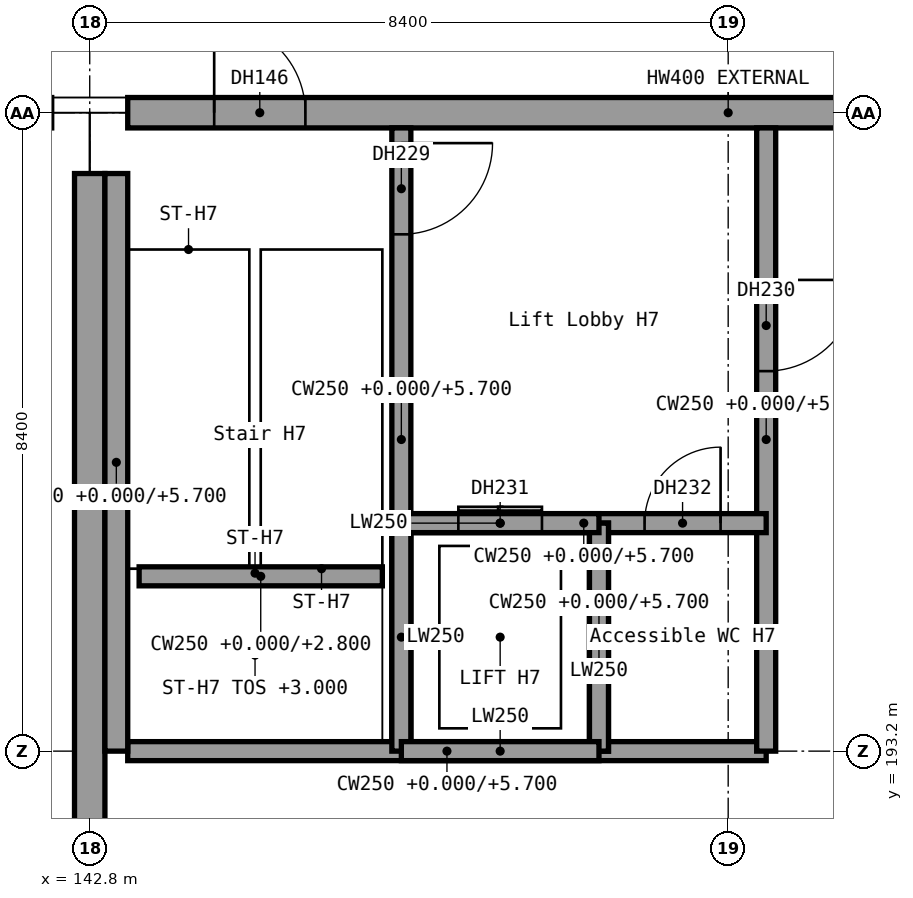
"""IFC4 building model, lengths in metres.
Left out: names, types, materials, properties, quantities, classifications, styles, units other than length and angle.
Written with IfcOpenShell. Run it as: python <this file> out.ifc"""

import sys

from ifc_helpers import new_model, si_unit, direction, frame, frame_2d, origin, origin_2d, place, context, subcontext, project, spatial, rectangle, extrude, element, fill, save


model = new_model("IFC4")
c1 = context("Model", 3, precision=1e-05, world=origin(), true_north=direction((0.0, 1.0)))
c2 = subcontext(c1, "Body", "Model", "MODEL_VIEW")
j1 = project(units=[si_unit("LENGTHUNIT", "METRE"), si_unit("PLANEANGLEUNIT", "RADIAN")], contexts=[c1])
p1 = place(None, origin())
s1 = spatial("IfcSite", under=j1, at=p1, CompositionType="ELEMENT")
p2 = place(p1, origin())
s2 = spatial("IfcBuilding", under=s1, at=p2, CompositionType="ELEMENT")
p3 = place(p2, origin())
s3 = spatial("IfcBuildingStorey", under=s2, at=p3, CompositionType="ELEMENT", Elevation=0.0)
p4 = place(p3, frame((142.8, 201.6, 0.0), z_axis=(0.0, 0.0, 1.0), x_axis=(1.0, 0.0, 0.0)))
e1 = element("IfcColumn", 1, at=p4, inside=s3, PredefinedType="COLUMN", context=c2, shape_type="SweptSolid", body=[
    extrude(rectangle(XDim=1.0, YDim=1.6, at=origin_2d()), origin(), (0.0, 0.0, 1.0), 6.0),
])
p5 = place(p3, frame((143.3, 201.6, 0.0), z_axis=(0.0, 0.0, 1.0), x_axis=(1.0, 0.0, 0.0)))
e2 = element("IfcWall", 2, at=p5, inside=s3, PredefinedType="STANDARD", context=c2, shape_type="SweptSolid", body=[
    extrude(rectangle(XDim=15.8, YDim=0.4, at=frame_2d((7.9, 0.0))), origin(), (0.0, 0.0, 1.0), 4.5),
])
p6 = place(p5, frame((1.137, 0.0, 0.0)))
e3 = element("IfcOpeningElement", 3, at=p6, cuts=e2, PredefinedType="OPENING", context=c2, shape_type="SweptSolid", body=[
    extrude(rectangle(XDim=1.2, YDim=2.1, at=frame_2d((0.6, 1.05))), frame((0.0, 0.2, 0.0), z_axis=(0.0, -1.0, 0.0), x_axis=(1.0, 0.0, 0.0)), (0.0, 0.0, 1.0), 0.4),
])
p7 = place(p5, frame((11.4, 0.0, 0.0)))
e4 = element("IfcOpeningElement", 4, at=p7, cuts=e2, PredefinedType="OPENING", context=c2, shape_type="SweptSolid", body=[
    extrude(rectangle(XDim=3.0, YDim=2.4, at=frame_2d((1.5, 1.2))), frame((0.0, 0.2, 0.0), z_axis=(0.0, -1.0, 0.0), x_axis=(1.0, 0.0, 0.0)), (0.0, 0.0, 1.0), 0.4),
])
p8 = place(p3, frame((142.8, 101.6, 0.0), z_axis=(0.0, 0.0, 1.0), x_axis=(0.0, 1.0, 0.0)))
e5 = element("IfcWall", 5, at=p8, inside=s3, PredefinedType="SHEAR", context=c2, shape_type="SweptSolid", body=[
    extrude(rectangle(XDim=99.2, YDim=0.4, at=frame_2d((49.6, 0.0))), origin(), (0.0, 0.0, 1.0), 6.0),
])
p9 = place(p8, frame((19.2, 0.0, 0.0)))
e6 = element("IfcOpeningElement", 6, at=p9, cuts=e5, PredefinedType="OPENING", context=c2, shape_type="SweptSolid", body=[
    extrude(rectangle(XDim=2.4, YDim=2.4, at=frame_2d((1.2, 1.2))), frame((0.0, 0.2, 0.0), z_axis=(0.0, -1.0, 0.0), x_axis=(1.0, 0.0, 0.0)), (0.0, 0.0, 1.0), 0.4),
])
p10 = place(p8, frame((39.2, 0.0, 0.0)))
e7 = element("IfcOpeningElement", 7, at=p10, cuts=e5, PredefinedType="OPENING", context=c2, shape_type="SweptSolid", body=[
    extrude(rectangle(XDim=2.4, YDim=2.4, at=frame_2d((1.2, 1.2))), frame((0.0, 0.2, 0.0), z_axis=(0.0, -1.0, 0.0), x_axis=(1.0, 0.0, 0.0)), (0.0, 0.0, 1.0), 0.4),
])
p11 = place(p8, frame((57.2, 0.0, 0.0)))
e8 = element("IfcOpeningElement", 8, at=p11, cuts=e5, PredefinedType="OPENING", context=c2, shape_type="SweptSolid", body=[
    extrude(rectangle(XDim=2.4, YDim=2.4, at=frame_2d((1.2, 1.2))), frame((0.0, 0.2, 0.0), z_axis=(0.0, -1.0, 0.0), x_axis=(1.0, 0.0, 0.0)), (0.0, 0.0, 1.0), 0.4),
])
p12 = place(p8, frame((77.2, 0.0, 0.0)))
e9 = element("IfcOpeningElement", 9, at=p12, cuts=e5, PredefinedType="OPENING", context=c2, shape_type="SweptSolid", body=[
    extrude(rectangle(XDim=2.4, YDim=2.4, at=frame_2d((1.2, 1.2))), frame((0.0, 0.2, 0.0), z_axis=(0.0, -1.0, 0.0), x_axis=(1.0, 0.0, 0.0)), (0.0, 0.0, 1.0), 0.4),
])
p13 = place(p3, frame((146.9, 201.4, 0.0), z_axis=(0.0, 0.0, 1.0), x_axis=(0.0, -1.0, 0.0)))
e10 = element("IfcWall", 10, at=p13, inside=s3, PredefinedType="SHEAR", context=c2, shape_type="SweptSolid", body=[
    extrude(rectangle(XDim=8.2, YDim=0.25, at=frame_2d((4.1, 0.0))), origin(), (0.0, 0.0, 1.0), 5.7),
])
p14 = place(p13, frame((0.2, 0.0, 0.0)))
e11 = element("IfcOpeningElement", 11, at=p14, cuts=e10, PredefinedType="OPENING", context=c2, shape_type="SweptSolid", body=[
    extrude(rectangle(XDim=1.2, YDim=2.1, at=frame_2d((0.6, 1.05))), frame((0.0, 0.125, 0.0), z_axis=(0.0, -1.0, 0.0), x_axis=(1.0, 0.0, 0.0)), (0.0, 0.0, 1.0), 0.25),
])
p15 = place(p3, frame((143.3, 193.2, 0.0), z_axis=(0.0, 0.0, 1.0), x_axis=(1.0, 0.0, 0.0)))
e12 = element("IfcWall", 12, at=p15, inside=s3, PredefinedType="SHEAR", context=c2, shape_type="SweptSolid", body=[
    extrude(rectangle(XDim=8.4, YDim=0.25, at=frame_2d((4.2, 0.0))), origin(), (0.0, 0.0, 1.0), 5.7),
])
p16 = place(p3, frame((151.7, 201.4, 0.0), z_axis=(0.0, 0.0, 1.0), x_axis=(0.0, -1.0, 0.0)))
e13 = element("IfcWall", 13, at=p16, inside=s3, PredefinedType="SHEAR", context=c2, shape_type="SweptSolid", body=[
    extrude(rectangle(XDim=8.2, YDim=0.25, at=frame_2d((4.1, 0.0))), origin(), (0.0, 0.0, 1.0), 5.7),
])
p17 = place(p16, frame((2.0, 0.0, 0.0)))
e14 = element("IfcOpeningElement", 14, at=p17, cuts=e13, PredefinedType="OPENING", context=c2, shape_type="SweptSolid", body=[
    extrude(rectangle(XDim=1.2, YDim=2.1, at=frame_2d((0.6, 1.05))), frame((0.0, 0.125, 0.0), z_axis=(0.0, -1.0, 0.0), x_axis=(1.0, 0.0, 0.0)), (0.0, 0.0, 1.0), 0.25),
])
p18 = place(p3, frame((146.9, 196.2, 0.0), z_axis=(0.0, 0.0, 1.0), x_axis=(1.0, 0.0, 0.0)))
e15 = element("IfcWall", 15, at=p18, inside=s3, PredefinedType="SHEAR", context=c2, shape_type="SweptSolid", body=[
    extrude(rectangle(XDim=4.8, YDim=0.25, at=frame_2d((2.4, 0.0))), origin(), (0.0, 0.0, 1.0), 5.7),
])
p19 = place(p18, frame((0.75, 0.0, 0.0)))
e16 = element("IfcOpeningElement", 16, at=p19, cuts=e15, PredefinedType="OPENING", context=c2, shape_type="SweptSolid", body=[
    extrude(rectangle(XDim=1.1, YDim=2.1, at=frame_2d((0.55, 1.05))), frame((0.0, 0.125, 0.0), z_axis=(0.0, -1.0, 0.0), x_axis=(1.0, 0.0, 0.0)), (0.0, 0.0, 1.0), 0.25),
])
p20 = place(p18, frame((3.2, 0.0, 0.0)))
e17 = element("IfcOpeningElement", 17, at=p20, cuts=e15, PredefinedType="OPENING", context=c2, shape_type="SweptSolid", body=[
    extrude(rectangle(XDim=1.0, YDim=2.1, at=frame_2d((0.5, 1.05))), frame((0.0, 0.125, 0.0), z_axis=(0.0, -1.0, 0.0), x_axis=(1.0, 0.0, 0.0)), (0.0, 0.0, 1.0), 0.25),
])
p21 = place(p3, frame((149.5, 196.2, 0.0), z_axis=(0.0, 0.0, 1.0), x_axis=(0.0, -1.0, 0.0)))
e18 = element("IfcWall", 18, at=p21, inside=s3, PredefinedType="SHEAR", context=c2, shape_type="SweptSolid", body=[
    extrude(rectangle(XDim=3.0, YDim=0.25, at=frame_2d((1.5, 0.0))), origin(), (0.0, 0.0, 1.0), 5.7),
])
p22 = place(p3, frame((143.15, 200.8, 0.0), z_axis=(0.0, 0.0, 1.0), x_axis=(0.0, -1.0, 0.0)))
e19 = element("IfcWall", 19, at=p22, inside=s3, PredefinedType="SHEAR", context=c2, shape_type="SweptSolid", body=[
    extrude(rectangle(XDim=7.6, YDim=0.3, at=frame_2d((3.8, 0.0))), origin(), (0.0, 0.0, 1.0), 5.7),
])
p23 = place(p3, frame((143.45, 195.5, 0.0), z_axis=(0.0, 0.0, 1.0), x_axis=(1.0, 0.0, 0.0)))
e20 = element("IfcWall", 20, at=p23, inside=s3, PredefinedType="SHEAR", context=c2, shape_type="SweptSolid", body=[
    extrude(rectangle(XDim=3.2, YDim=0.25, at=frame_2d((1.6, 0.0))), origin(), (0.0, 0.0, 1.0), 2.8),
])
for number, where, z_axis, x_axis in (
    (21, (146.9, 196.2, -1.4), (0.0, 0.0, 1.0), (0.0, -1.0, 0.0)),
    (22, (149.5, 196.2, -1.4), (0.0, 0.0, 1.0), (0.0, -1.0, 0.0)),
):
    element("IfcWall", number, at=place(p3, frame(where, z_axis=z_axis, x_axis=x_axis)), inside=s3, PredefinedType="SHEAR", context=c2, shape_type="SweptSolid", body=[
        extrude(rectangle(XDim=3.0, YDim=0.25, at=frame_2d((1.5, 0.0))), origin(), (0.0, 0.0, 1.0), 1.4),
    ])
for number, where, z_axis, x_axis in (
    (23, (146.9, 196.2, -1.4), (0.0, 0.0, 1.0), (1.0, 0.0, 0.0)),
    (24, (146.9, 193.2, -1.4), (0.0, 0.0, 1.0), (1.0, 0.0, 0.0)),
):
    element("IfcWall", number, at=place(p3, frame(where, z_axis=z_axis, x_axis=x_axis)), inside=s3, PredefinedType="SHEAR", context=c2, shape_type="SweptSolid", body=[
        extrude(rectangle(XDim=2.6, YDim=0.25, at=frame_2d((1.3, 0.0))), origin(), (0.0, 0.0, 1.0), 1.4),
    ])
p24 = place(p6, origin())
e25 = element("IfcDoor", 25, at=p24, inside=s3, OperationType="SINGLE_SWING_LEFT", PredefinedType="DOOR", context=c2, shape_type="SweptSolid", body=[
    extrude(rectangle(XDim=1.2, YDim=2.1, at=frame_2d((0.6, 1.05))), frame((0.0, 0.025, 0.0), z_axis=(0.0, -1.0, 0.0), x_axis=(1.0, 0.0, 0.0)), (0.0, 0.0, 1.0), 0.05),
])
fill(e3, e25)
p25 = place(p14, origin())
e26 = element("IfcDoor", 26, at=p25, inside=s3, OperationType="SINGLE_SWING_LEFT", PredefinedType="DOOR", context=c2, shape_type="SweptSolid", body=[
    extrude(rectangle(XDim=1.2, YDim=2.1, at=frame_2d((0.6, 1.05))), frame((0.0, 0.025, 0.0), z_axis=(0.0, -1.0, 0.0), x_axis=(1.0, 0.0, 0.0)), (0.0, 0.0, 1.0), 0.05),
])
fill(e11, e26)
p26 = place(p17, origin())
e27 = element("IfcDoor", 27, at=p26, inside=s3, OperationType="SINGLE_SWING_LEFT", PredefinedType="DOOR", context=c2, shape_type="SweptSolid", body=[
    extrude(rectangle(XDim=1.2, YDim=2.1, at=frame_2d((0.6, 1.05))), frame((0.0, 0.025, 0.0), z_axis=(0.0, -1.0, 0.0), x_axis=(1.0, 0.0, 0.0)), (0.0, 0.0, 1.0), 0.05),
])
fill(e14, e27)
p27 = place(p19, origin())
e28 = element("IfcDoor", 28, at=p27, inside=s3, OperationType="DOUBLE_DOOR_SLIDING", PredefinedType="DOOR", context=c2, shape_type="SweptSolid", body=[
    extrude(rectangle(XDim=1.1, YDim=2.1, at=frame_2d((0.55, 1.05))), frame((0.0, 0.025, 0.0), z_axis=(0.0, -1.0, 0.0), x_axis=(1.0, 0.0, 0.0)), (0.0, 0.0, 1.0), 0.05),
])
fill(e16, e28)
p28 = place(p20, origin())
e29 = element("IfcDoor", 29, at=p28, inside=s3, OperationType="SINGLE_SWING_RIGHT", PredefinedType="DOOR", context=c2, shape_type="SweptSolid", body=[
    extrude(rectangle(XDim=1.0, YDim=2.1, at=frame_2d((0.5, 1.05))), frame((0.0, 0.025, 0.0), z_axis=(0.0, -1.0, 0.0), x_axis=(1.0, 0.0, 0.0)), (0.0, 0.0, 1.0), 0.05),
])
fill(e17, e29)
save(model, sys.argv[1])
